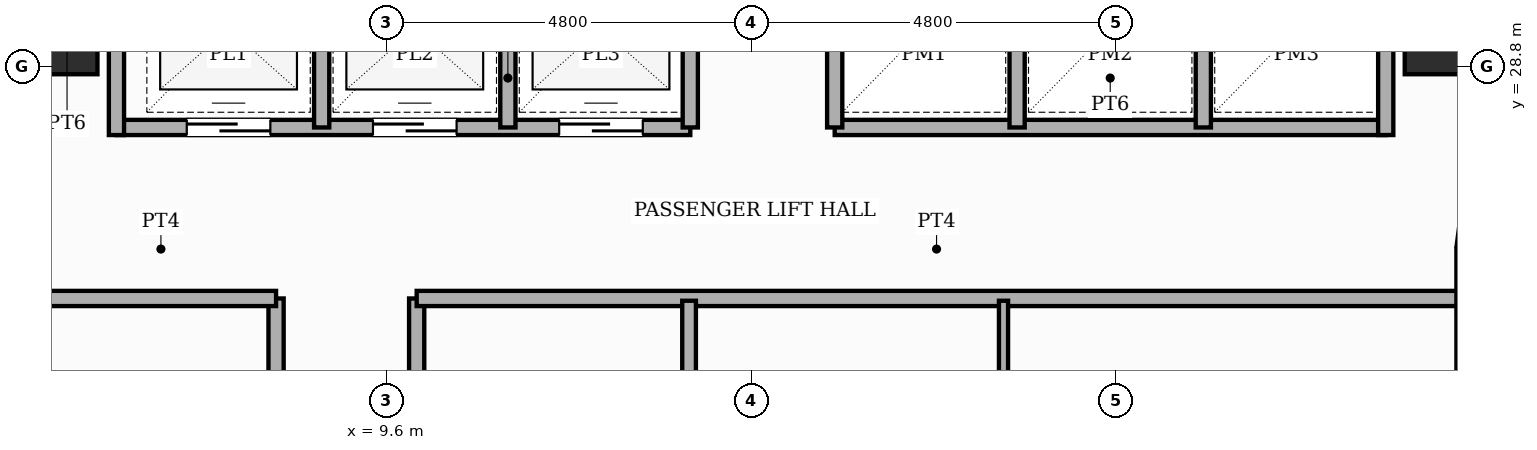
"""IFC4 building model, lengths in metres.
Left out: names, types, materials, properties, quantities, classifications, styles, units other than length and angle.
Written with IfcOpenShell. Run it as: python <this file> out.ifc"""

import sys

from ifc_helpers import new_model, si_unit, direction, frame, frame_2d, origin, origin_2d, place, context, subcontext, project, spatial, rectangle, extrude, element, fill, save


model = new_model("IFC4")
c1 = context("Model", 3, precision=1e-05, world=origin(), true_north=direction((0.0, 1.0)))
c2 = subcontext(c1, "Body", "Model", "MODEL_VIEW")
j1 = project(units=[si_unit("LENGTHUNIT", "METRE"), si_unit("PLANEANGLEUNIT", "RADIAN")], contexts=[c1])
p1 = place(None, origin())
s1 = spatial("IfcSite", under=j1, at=p1, CompositionType="ELEMENT")
p2 = place(p1, origin())
s2 = spatial("IfcBuilding", under=s1, at=p2, CompositionType="ELEMENT")
p3 = place(p2, frame((0.0, 0.0, 68.2)))
s3 = spatial("IfcBuildingStorey", under=s2, at=p3, CompositionType="ELEMENT", Elevation=68.2)
for number, where, z_axis, x_axis in (
    (1, (5.25, 29.25, 0.0), (0.0, 0.0, 1.0), (1.0, 0.0, 0.0)),
    (2, (23.55, 29.25, 0.0), (0.0, 0.0, 1.0), (1.0, 0.0, 0.0)),
):
    element("IfcColumn", number, at=place(p3, frame(where, z_axis=z_axis, x_axis=x_axis)), inside=s3, PredefinedType="COLUMN", context=c2, shape_type="SweptSolid", body=[
        extrude(rectangle(XDim=1.1, YDim=1.1, at=origin_2d()), origin(), (0.0, 0.0, 1.0), 3.6),
    ])
p4 = place(p3, frame((23.923, 27.042, 0.0), z_axis=(0.0, 0.0, 1.0), x_axis=(-0.130555323746, -0.9914410257, 0.0)))
e3 = element("IfcWall", 3, at=p4, inside=s3, PredefinedType="STANDARD", context=c2, shape_type="SweptSolid", body=[
    extrude(rectangle(XDim=0.626, YDim=0.32, at=frame_2d((0.313, 0.0))), origin(), (0.0, 0.0, 1.0), 2.53),
])
p5 = place(p3, frame((23.84, 26.4, 0.0), z_axis=(0.0, 0.0, 1.0), x_axis=(0.0, -1.0, 0.0)))
e4 = element("IfcWall", 4, at=p5, inside=s3, PredefinedType="STANDARD", context=c2, shape_type="SweptSolid", body=[
    extrude(rectangle(XDim=19.2, YDim=0.32, at=frame_2d((9.6, 0.0))), origin(), (0.0, 0.0, 1.0), 2.53),
])
p6 = place(p5, frame((14.94, 0.0, 0.45)))
e5 = element("IfcOpeningElement", 5, at=p6, cuts=e4, PredefinedType="OPENING", context=c2, shape_type="SweptSolid", body=[
    extrude(rectangle(XDim=0.95, YDim=1.8, at=frame_2d((0.475, 0.9))), frame((0.0, 0.17, 0.0), z_axis=(0.0, -1.0, 0.0), x_axis=(1.0, 0.0, 0.0)), (0.0, 0.0, 1.0), 0.34),
])
p7 = place(p5, frame((8.204, 0.0, 0.65)))
e6 = element("IfcOpeningElement", 6, at=p7, cuts=e4, PredefinedType="OPENING", context=c2, shape_type="SweptSolid", body=[
    extrude(rectangle(XDim=1.4, YDim=1.1, at=frame_2d((0.7, 0.55))), frame((0.0, 0.17, 0.0), z_axis=(0.0, -1.0, 0.0), x_axis=(1.0, 0.0, 0.0)), (0.0, 0.0, 1.0), 0.34),
])
p8 = place(p5, frame((0.88, 0.0, 0.45)))
e7 = element("IfcOpeningElement", 7, at=p8, cuts=e4, PredefinedType="OPENING", context=c2, shape_type="SweptSolid", body=[
    extrude(rectangle(XDim=0.75, YDim=1.8, at=frame_2d((0.375, 0.9))), frame((0.0, 0.17, 0.0), z_axis=(0.0, -1.0, 0.0), x_axis=(1.0, 0.0, 0.0)), (0.0, 0.0, 1.0), 0.34),
])
p9 = place(p5, frame((10.259, 0.0, 0.45)))
e8 = element("IfcOpeningElement", 8, at=p9, cuts=e4, PredefinedType="OPENING", context=c2, shape_type="SweptSolid", body=[
    extrude(rectangle(XDim=0.95, YDim=1.8, at=frame_2d((0.475, 0.9))), frame((0.0, 0.17, 0.0), z_axis=(0.0, -1.0, 0.0), x_axis=(1.0, 0.0, 0.0)), (0.0, 0.0, 1.0), 0.34),
])
p10 = place(p5, frame((4.838, 0.0, 0.65)))
e9 = element("IfcOpeningElement", 9, at=p10, cuts=e4, PredefinedType="OPENING", context=c2, shape_type="SweptSolid", body=[
    extrude(rectangle(XDim=1.4, YDim=1.1, at=frame_2d((0.7, 0.55))), frame((0.0, 0.17, 0.0), z_axis=(0.0, -1.0, 0.0), x_axis=(1.0, 0.0, 0.0)), (0.0, 0.0, 1.0), 0.34),
])
p11 = place(p3, frame((6.05, 28.0, 0.0), z_axis=(0.0, 0.0, 1.0), x_axis=(1.0, 0.0, 0.0)))
e10 = element("IfcWall", 10, at=p11, inside=s3, PredefinedType="POLYGONAL", context=c2, shape_type="SweptSolid", body=[
    extrude(rectangle(XDim=7.55, YDim=0.2, at=frame_2d((3.775, 0.0))), origin(), (0.0, 0.0, 1.0), 3.35),
])
p12 = place(p11, frame((0.925, 0.0, 0.0)))
e11 = element("IfcOpeningElement", 11, at=p12, cuts=e10, PredefinedType="OPENING", context=c2, shape_type="SweptSolid", body=[
    extrude(rectangle(XDim=1.1, YDim=2.15, at=frame_2d((0.55, 1.075))), frame((0.0, 0.11, 0.0), z_axis=(0.0, -1.0, 0.0), x_axis=(1.0, 0.0, 0.0)), (0.0, 0.0, 1.0), 0.22),
])
p13 = place(p11, frame((3.375, 0.0, 0.0)))
e12 = element("IfcOpeningElement", 12, at=p13, cuts=e10, PredefinedType="OPENING", context=c2, shape_type="SweptSolid", body=[
    extrude(rectangle(XDim=1.1, YDim=2.15, at=frame_2d((0.55, 1.075))), frame((0.0, 0.11, 0.0), z_axis=(0.0, -1.0, 0.0), x_axis=(1.0, 0.0, 0.0)), (0.0, 0.0, 1.0), 0.22),
])
p14 = place(p11, frame((5.825, 0.0, 0.0)))
e13 = element("IfcOpeningElement", 13, at=p14, cuts=e10, PredefinedType="OPENING", context=c2, shape_type="SweptSolid", body=[
    extrude(rectangle(XDim=1.1, YDim=2.15, at=frame_2d((0.55, 1.075))), frame((0.0, 0.11, 0.0), z_axis=(0.0, -1.0, 0.0), x_axis=(1.0, 0.0, 0.0)), (0.0, 0.0, 1.0), 0.22),
])
p15 = place(p3, frame((15.5, 28.0, 0.0), z_axis=(0.0, 0.0, 1.0), x_axis=(1.0, 0.0, 0.0)))
e14 = element("IfcWall", 14, at=p15, inside=s3, PredefinedType="POLYGONAL", context=c2, shape_type="SweptSolid", body=[
    extrude(rectangle(XDim=7.25, YDim=0.2, at=frame_2d((3.625, 0.0))), origin(), (0.0, 0.0, 1.0), 3.35),
])
for number, where, z_axis, x_axis in (
    (15, (6.05, 27.9, 0.0), (0.0, 0.0, 1.0), (0.0, 1.0, 0.0)),
    (16, (22.75, 27.9, 0.0), (0.0, 0.0, 1.0), (0.0, 1.0, 0.0)),
):
    element("IfcWall", number, at=place(p3, frame(where, z_axis=z_axis, x_axis=x_axis)), inside=s3, PredefinedType="POLYGONAL", context=c2, shape_type="SweptSolid", body=[
        extrude(rectangle(XDim=3.0, YDim=0.2, at=frame_2d((1.5, 0.0))), origin(), (0.0, 0.0, 1.0), 3.35),
    ])
for number, where, z_axis, x_axis in (
    (17, (13.6, 28.0, 0.0), (0.0, 0.0, 1.0), (0.0, 1.0, 0.0)),
    (18, (15.5, 28.0, 0.0), (0.0, 0.0, 1.0), (0.0, 1.0, 0.0)),
    (19, (8.75, 28.0, 0.0), (0.0, 0.0, 1.0), (0.0, 1.0, 0.0)),
    (20, (11.2, 28.0, 0.0), (0.0, 0.0, 1.0), (0.0, 1.0, 0.0)),
    (21, (17.9, 28.0, 0.0), (0.0, 0.0, 1.0), (0.0, 1.0, 0.0)),
    (22, (20.35, 28.0, 0.0), (0.0, 0.0, 1.0), (0.0, 1.0, 0.0)),
):
    element("IfcWall", number, at=place(p3, frame(where, z_axis=z_axis, x_axis=x_axis)), inside=s3, PredefinedType="POLYGONAL", context=c2, shape_type="SweptSolid", body=[
        extrude(rectangle(XDim=2.9, YDim=0.2, at=frame_2d((1.45, 0.0))), origin(), (0.0, 0.0, 1.0), 3.35),
    ])
p16 = place(p3, frame((8.15, 5.12, 0.0), z_axis=(0.0, 0.0, 1.0), x_axis=(0.0, 1.0, 0.0)))
e23 = element("IfcWall", 23, at=p16, inside=s3, PredefinedType="PARTITIONING", context=c2, shape_type="SweptSolid", body=[
    extrude(rectangle(XDim=20.63, YDim=0.2, at=frame_2d((10.315, 0.0))), origin(), (0.0, 0.0, 1.0), 3.35),
])
p17 = place(p16, frame((4.65, 0.0, 0.0)))
e24 = element("IfcOpeningElement", 24, at=p17, cuts=e23, PredefinedType="OPENING", context=c2, shape_type="SweptSolid", body=[
    extrude(rectangle(XDim=0.95, YDim=2.15, at=frame_2d((0.475, 1.075))), frame((0.0, 0.11, 0.0), z_axis=(0.0, -1.0, 0.0), x_axis=(1.0, 0.0, 0.0)), (0.0, 0.0, 1.0), 0.22),
])
p18 = place(p16, frame((14.97, 0.0, 0.0)))
e25 = element("IfcOpeningElement", 25, at=p18, cuts=e23, PredefinedType="OPENING", context=c2, shape_type="SweptSolid", body=[
    extrude(rectangle(XDim=0.95, YDim=2.15, at=frame_2d((0.475, 1.075))), frame((0.0, 0.11, 0.0), z_axis=(0.0, -1.0, 0.0), x_axis=(1.0, 0.0, 0.0)), (0.0, 0.0, 1.0), 0.22),
])
p19 = place(p3, frame((10.0, 5.12, 0.0), z_axis=(0.0, 0.0, 1.0), x_axis=(0.0, 1.0, 0.0)))
e26 = element("IfcWall", 26, at=p19, inside=s3, PredefinedType="PARTITIONING", context=c2, shape_type="SweptSolid", body=[
    extrude(rectangle(XDim=20.63, YDim=0.2, at=frame_2d((10.315, 0.0))), origin(), (0.0, 0.0, 1.0), 3.35),
])
p20 = place(p19, frame((0.998, 0.0, 0.0)))
e27 = element("IfcOpeningElement", 27, at=p20, cuts=e26, PredefinedType="OPENING", context=c2, shape_type="SweptSolid", body=[
    extrude(rectangle(XDim=0.98, YDim=2.18, at=frame_2d((0.49, 1.09))), frame((0.0, 0.11, 0.0), z_axis=(0.0, -1.0, 0.0), x_axis=(1.0, 0.0, 0.0)), (0.0, 0.0, 1.0), 0.22),
])
p21 = place(p19, frame((8.491, 0.0, 0.0)))
e28 = element("IfcOpeningElement", 28, at=p21, cuts=e26, PredefinedType="OPENING", context=c2, shape_type="SweptSolid", body=[
    extrude(rectangle(XDim=0.98, YDim=2.18, at=frame_2d((0.49, 1.09))), frame((0.0, 0.11, 0.0), z_axis=(0.0, -1.0, 0.0), x_axis=(1.0, 0.0, 0.0)), (0.0, 0.0, 1.0), 0.22),
])
p22 = place(p19, frame((14.787, 0.0, 0.0)))
e29 = element("IfcOpeningElement", 29, at=p22, cuts=e26, PredefinedType="OPENING", context=c2, shape_type="SweptSolid", body=[
    extrude(rectangle(XDim=0.98, YDim=2.18, at=frame_2d((0.49, 1.09))), frame((0.0, 0.11, 0.0), z_axis=(0.0, -1.0, 0.0), x_axis=(1.0, 0.0, 0.0)), (0.0, 0.0, 1.0), 0.22),
])
p23 = place(p3, frame((5.12, 25.75, 0.0), z_axis=(0.0, 0.0, 1.0), x_axis=(1.0, 0.0, 0.0)))
e30 = element("IfcWall", 30, at=p23, inside=s3, PredefinedType="PARTITIONING", context=c2, shape_type="SweptSolid", body=[
    extrude(rectangle(XDim=3.03, YDim=0.2, at=frame_2d((1.515, 0.0))), origin(), (0.0, 0.0, 1.0), 3.35),
])
p24 = place(p3, frame((10.0, 25.75, 0.0), z_axis=(0.0, 0.0, 1.0), x_axis=(1.0, 0.0, 0.0)))
e31 = element("IfcWall", 31, at=p24, inside=s3, PredefinedType="PARTITIONING", context=c2, shape_type="SweptSolid", body=[
    extrude(rectangle(XDim=13.68, YDim=0.2, at=frame_2d((6.84, 0.0))), origin(), (0.0, 0.0, 1.0), 3.35),
])
p25 = place(p3, frame((13.584, 21.954, 0.0), z_axis=(0.0, 0.0, 1.0), x_axis=(0.0, 1.0, 0.0)))
e32 = element("IfcWall", 32, at=p25, inside=s3, PredefinedType="PLUMBINGWALL", context=c2, shape_type="SweptSolid", body=[
    extrude(rectangle(XDim=3.766, YDim=0.18, at=frame_2d((1.883, 0.0))), origin(), (0.0, 0.0, 1.0), 3.35),
])
p26 = place(p3, frame((17.721, 21.954, 0.0), z_axis=(0.0, 0.0, 1.0), x_axis=(0.0, 1.0, 0.0)))
e33 = element("IfcWall", 33, at=p26, inside=s3, PredefinedType="PARTITIONING", context=c2, shape_type="SweptSolid", body=[
    extrude(rectangle(XDim=3.766, YDim=0.12, at=frame_2d((1.883, 0.0))), origin(), (0.0, 0.0, 1.0), 3.35),
])
p27 = place(p12, origin())
e34 = element("IfcDoor", 34, at=p27, inside=s3, OperationType="SLIDING_TO_LEFT", PredefinedType="DOOR", context=c2, shape_type="SweptSolid", body=[
    extrude(rectangle(XDim=1.1, YDim=2.15, at=frame_2d((0.55, 1.075))), frame((0.0, 0.025, 0.0), z_axis=(0.0, -1.0, 0.0), x_axis=(1.0, 0.0, 0.0)), (0.0, 0.0, 1.0), 0.05),
])
fill(e11, e34)
p28 = place(p13, origin())
e35 = element("IfcDoor", 35, at=p28, inside=s3, OperationType="SLIDING_TO_RIGHT", PredefinedType="DOOR", context=c2, shape_type="SweptSolid", body=[
    extrude(rectangle(XDim=1.1, YDim=2.15, at=frame_2d((0.55, 1.075))), frame((0.0, 0.025, 0.0), z_axis=(0.0, -1.0, 0.0), x_axis=(1.0, 0.0, 0.0)), (0.0, 0.0, 1.0), 0.05),
])
fill(e12, e35)
p29 = place(p14, origin())
e36 = element("IfcDoor", 36, at=p29, inside=s3, OperationType="SLIDING_TO_LEFT", PredefinedType="DOOR", context=c2, shape_type="SweptSolid", body=[
    extrude(rectangle(XDim=1.1, YDim=2.15, at=frame_2d((0.55, 1.075))), frame((0.0, 0.025, 0.0), z_axis=(0.0, -1.0, 0.0), x_axis=(1.0, 0.0, 0.0)), (0.0, 0.0, 1.0), 0.05),
])
fill(e13, e36)
save(model, sys.argv[1])
